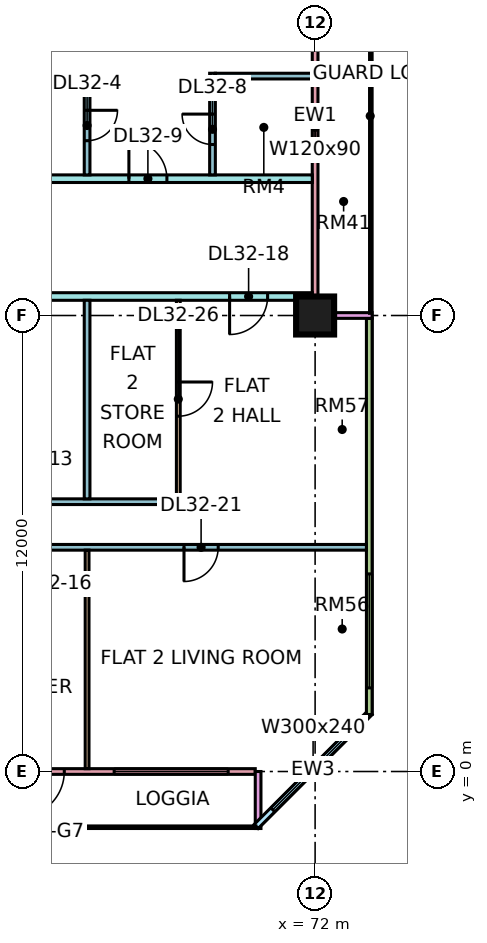
"""IFC4 building model, lengths in metres.
Left out: names, types, materials, properties, quantities, classifications, styles, units other than length and angle.
Written with IfcOpenShell. Run it as: python <this file> out.ifc"""

import sys

from ifc_helpers import new_model, si_unit, direction, frame, frame_2d, origin, origin_2d, place, context, subcontext, project, spatial, rectangle, extrude, element, fill, save


model = new_model("IFC4")
c1 = context("Model", 3, precision=1e-05, world=origin(), true_north=direction((0.0, 1.0)))
c2 = subcontext(c1, "Body", "Model", "MODEL_VIEW")
j1 = project(units=[si_unit("LENGTHUNIT", "METRE"), si_unit("PLANEANGLEUNIT", "RADIAN")], contexts=[c1])
p1 = place(None, origin())
s1 = spatial("IfcSite", under=j1, at=p1, CompositionType="ELEMENT")
p2 = place(p1, origin())
s2 = spatial("IfcBuilding", under=s1, at=p2, CompositionType="ELEMENT")
p3 = place(p2, frame((0.0, 0.0, 136.9)))
s3 = spatial("IfcBuildingStorey", under=s2, at=p3, CompositionType="ELEMENT", Elevation=136.9)
p4 = place(p3, frame((72.0, 12.0, 0.0), z_axis=(0.0, 0.0, 1.0), x_axis=(1.0, 0.0, 0.0)))
e1 = element("IfcColumn", 1, at=p4, inside=s3, PredefinedType="COLUMN", context=c2, shape_type="SweptSolid", body=[
    extrude(rectangle(XDim=1.0, YDim=1.0, at=origin_2d()), origin(), (0.0, 0.0, 1.0), 3.75),
])
p5 = place(p3, frame((60.075, 0.0, 0.0), z_axis=(0.0, 0.0, 1.0), x_axis=(1.0, 0.0, 0.0)))
e2 = element("IfcWall", 2, at=p5, inside=s3, PredefinedType="SOLIDWALL", context=c2, shape_type="SweptSolid", body=[
    extrude(rectangle(XDim=10.35, YDim=0.15, at=frame_2d((5.175, 0.0))), origin(), (0.0, 0.0, 1.0), 3.3),
])
p6 = place(p5, frame((0.562, 0.0, 0.45)))
e3 = element("IfcOpeningElement", 3, at=p6, cuts=e2, PredefinedType="OPENING", context=c2, shape_type="SweptSolid", body=[
    extrude(rectangle(XDim=1.2, YDim=2.4, at=frame_2d((0.6, 1.2))), frame((0.0, 0.085, 0.0), z_axis=(0.0, -1.0, 0.0), x_axis=(1.0, 0.0, 0.0)), (0.0, 0.0, 1.0), 0.17),
])
p7 = place(p5, frame((4.125, 0.0, 0.0)))
e4 = element("IfcOpeningElement", 4, at=p7, cuts=e2, PredefinedType="OPENING", context=c2, shape_type="SweptSolid", body=[
    extrude(rectangle(XDim=1.2, YDim=2.4, at=frame_2d((0.6, 1.2))), frame((0.0, 0.085, 0.0), z_axis=(0.0, -1.0, 0.0), x_axis=(1.0, 0.0, 0.0)), (0.0, 0.0, 1.0), 0.17),
])
p8 = place(p5, frame((6.637, 0.0, 0.45)))
e5 = element("IfcOpeningElement", 5, at=p8, cuts=e2, PredefinedType="OPENING", context=c2, shape_type="SweptSolid", body=[
    extrude(rectangle(XDim=3.0, YDim=2.4, at=frame_2d((1.5, 1.2))), frame((0.0, 0.085, 0.0), z_axis=(0.0, -1.0, 0.0), x_axis=(1.0, 0.0, 0.0)), (0.0, 0.0, 1.0), 0.17),
])
p9 = place(p3, frame((70.5, -1.5, 0.0), z_axis=(0.0, 0.0, 1.0), x_axis=(0.0, 1.0, 0.0)))
e6 = element("IfcWall", 6, at=p9, inside=s3, PredefinedType="SOLIDWALL", context=c2, shape_type="SweptSolid", body=[
    extrude(rectangle(XDim=1.5, YDim=0.15, at=frame_2d((0.75, 0.0))), origin(), (0.0, 0.0, 1.0), 3.3),
])
p10 = place(p3, frame((70.447, -1.447, 0.0), z_axis=(0.0, 0.0, 1.0), x_axis=(0.707106781187, 0.707106781187, 0.0)))
e7 = element("IfcWall", 7, at=p10, inside=s3, PredefinedType="SOLIDWALL", context=c2, shape_type="SweptSolid", body=[
    extrude(rectangle(XDim=4.243, YDim=0.15, at=frame_2d((2.121, 0.0))), origin(), (0.0, 0.0, 1.0), 3.3),
])
p11 = place(p10, frame((0.621, 0.0, 0.45)))
e8 = element("IfcOpeningElement", 8, at=p11, cuts=e7, PredefinedType="OPENING", context=c2, shape_type="SweptSolid", body=[
    extrude(rectangle(XDim=3.0, YDim=2.4, at=frame_2d((1.5, 1.2))), frame((0.0, 0.085, 0.0), z_axis=(0.0, -1.0, 0.0), x_axis=(1.0, 0.0, 0.0)), (0.0, 0.0, 1.0), 0.17),
])
p12 = place(p3, frame((73.425, 1.5, 0.0), z_axis=(0.0, 0.0, 1.0), x_axis=(0.0, 1.0, 0.0)))
e9 = element("IfcWall", 9, at=p12, inside=s3, PredefinedType="SOLIDWALL", context=c2, shape_type="SweptSolid", body=[
    extrude(rectangle(XDim=10.425, YDim=0.15, at=frame_2d((5.212, 0.0))), origin(), (0.0, 0.0, 1.0), 3.3),
])
p13 = place(p12, frame((0.7, 0.0, 0.45)))
e10 = element("IfcOpeningElement", 10, at=p13, cuts=e9, PredefinedType="OPENING", context=c2, shape_type="SweptSolid", body=[
    extrude(rectangle(XDim=3.0, YDim=2.4, at=frame_2d((1.5, 1.2))), frame((0.0, 0.085, 0.0), z_axis=(0.0, -1.0, 0.0), x_axis=(1.0, 0.0, 0.0)), (0.0, 0.0, 1.0), 0.17),
])
p14 = place(p3, frame((72.0, 12.075, 0.0), z_axis=(0.0, 0.0, 1.0), x_axis=(0.0, 1.0, 0.0)))
e11 = element("IfcWall", 11, at=p14, inside=s3, PredefinedType="SOLIDWALL", context=c2, shape_type="SweptSolid", body=[
    extrude(rectangle(XDim=10.35, YDim=0.15, at=frame_2d((5.175, 0.0))), origin(), (0.0, 0.0, 1.0), 3.3),
])
p15 = place(p14, frame((4.275, 0.0, 1.7)))
e12 = element("IfcOpeningElement", 12, at=p15, cuts=e11, PredefinedType="OPENING", context=c2, shape_type="SweptSolid", body=[
    extrude(rectangle(XDim=1.2, YDim=0.9, at=frame_2d((0.6, 0.45))), frame((0.0, 0.085, 0.0), z_axis=(0.0, -1.0, 0.0), x_axis=(1.0, 0.0, 0.0)), (0.0, 0.0, 1.0), 0.17),
])
p16 = place(p14, frame((7.988, 0.0, 0.45)))
e13 = element("IfcOpeningElement", 13, at=p16, cuts=e11, PredefinedType="OPENING", context=c2, shape_type="SweptSolid", body=[
    extrude(rectangle(XDim=1.8, YDim=2.4, at=frame_2d((0.9, 1.2))), frame((0.0, 0.085, 0.0), z_axis=(0.0, -1.0, 0.0), x_axis=(1.0, 0.0, 0.0)), (0.0, 0.0, 1.0), 0.17),
])
p17 = place(p3, frame((73.5, 12.0, 0.0), z_axis=(0.0, 0.0, 1.0), x_axis=(-1.0, 0.0, 0.0)))
e14 = element("IfcWall", 14, at=p17, inside=s3, PredefinedType="SOLIDWALL", context=c2, shape_type="SweptSolid", body=[
    extrude(rectangle(XDim=1.5, YDim=0.15, at=frame_2d((0.75, 0.0))), origin(), (0.0, 0.0, 1.0), 3.3),
])
p18 = place(p3, frame((40.65, 12.5, 0.0), z_axis=(0.0, 0.0, 1.0), x_axis=(1.0, 0.0, 0.0)))
e15 = element("IfcWall", 15, at=p18, inside=s3, PredefinedType="PARTITIONING", context=c2, shape_type="SweptSolid", body=[
    extrude(rectangle(XDim=31.276, YDim=0.2, at=frame_2d((15.638, 0.0))), origin(), (0.0, 0.0, 1.0), 3.3),
])
p19 = place(p18, frame((29.1, 0.0, 0.0)))
e16 = element("IfcOpeningElement", 16, at=p19, cuts=e15, PredefinedType="OPENING", context=c2, shape_type="SweptSolid", body=[
    extrude(rectangle(XDim=1.0, YDim=2.1, at=frame_2d((0.5, 1.05))), frame((0.0, 0.11, 0.0), z_axis=(0.0, -1.0, 0.0), x_axis=(1.0, 0.0, 0.0)), (0.0, 0.0, 1.0), 0.22),
])
p20 = place(p18, frame((1.05, 0.0, 0.0)))
e17 = element("IfcOpeningElement", 17, at=p20, cuts=e15, PredefinedType="OPENING", context=c2, shape_type="SweptSolid", body=[
    extrude(rectangle(XDim=1.0, YDim=2.1, at=frame_2d((0.5, 1.05))), frame((0.0, 0.11, 0.0), z_axis=(0.0, -1.0, 0.0), x_axis=(1.0, 0.0, 0.0)), (0.0, 0.0, 1.0), 0.22),
])
p21 = place(p3, frame((48.1, 5.9, 0.0), z_axis=(0.0, 0.0, 1.0), x_axis=(1.0, 0.0, 0.0)))
e18 = element("IfcWall", 18, at=p21, inside=s3, PredefinedType="PARTITIONING", context=c2, shape_type="SweptSolid", body=[
    extrude(rectangle(XDim=25.25, YDim=0.15, at=frame_2d((12.625, 0.0))), origin(), (0.0, 0.0, 1.0), 3.3),
])
p22 = place(p21, frame((6.95, 0.0, 0.0)))
e19 = element("IfcOpeningElement", 19, at=p22, cuts=e18, PredefinedType="OPENING", context=c2, shape_type="SweptSolid", body=[
    extrude(rectangle(XDim=0.9, YDim=2.1, at=frame_2d((0.45, 1.05))), frame((0.0, 0.085, 0.0), z_axis=(0.0, -1.0, 0.0), x_axis=(1.0, 0.0, 0.0)), (0.0, 0.0, 1.0), 0.17),
])
p23 = place(p21, frame((9.95, 0.0, 0.0)))
e20 = element("IfcOpeningElement", 20, at=p23, cuts=e18, PredefinedType="OPENING", context=c2, shape_type="SweptSolid", body=[
    extrude(rectangle(XDim=0.9, YDim=2.1, at=frame_2d((0.45, 1.05))), frame((0.0, 0.085, 0.0), z_axis=(0.0, -1.0, 0.0), x_axis=(1.0, 0.0, 0.0)), (0.0, 0.0, 1.0), 0.17),
])
p24 = place(p21, frame((15.95, 0.0, 0.0)))
e21 = element("IfcOpeningElement", 21, at=p24, cuts=e18, PredefinedType="OPENING", context=c2, shape_type="SweptSolid", body=[
    extrude(rectangle(XDim=0.9, YDim=2.1, at=frame_2d((0.45, 1.05))), frame((0.0, 0.085, 0.0), z_axis=(0.0, -1.0, 0.0), x_axis=(1.0, 0.0, 0.0)), (0.0, 0.0, 1.0), 0.17),
])
p25 = place(p21, frame((20.45, 0.0, 0.0)))
e22 = element("IfcOpeningElement", 22, at=p25, cuts=e18, PredefinedType="OPENING", context=c2, shape_type="SweptSolid", body=[
    extrude(rectangle(XDim=0.9, YDim=2.1, at=frame_2d((0.45, 1.05))), frame((0.0, 0.085, 0.0), z_axis=(0.0, -1.0, 0.0), x_axis=(1.0, 0.0, 0.0)), (0.0, 0.0, 1.0), 0.17),
])
p26 = place(p21, frame((1.8, 0.0, 0.0)))
e23 = element("IfcOpeningElement", 23, at=p26, cuts=e18, PredefinedType="OPENING", context=c2, shape_type="SweptSolid", body=[
    extrude(rectangle(XDim=0.8, YDim=2.1, at=frame_2d((0.4, 1.05))), frame((0.0, 0.085, 0.0), z_axis=(0.0, -1.0, 0.0), x_axis=(1.0, 0.0, 0.0)), (0.0, 0.0, 1.0), 0.17),
])
p27 = place(p21, frame((3.65, 0.0, 0.0)))
e24 = element("IfcOpeningElement", 24, at=p27, cuts=e18, PredefinedType="OPENING", context=c2, shape_type="SweptSolid", body=[
    extrude(rectangle(XDim=1.6, YDim=2.1, at=frame_2d((0.8, 1.05))), frame((0.0, 0.085, 0.0), z_axis=(0.0, -1.0, 0.0), x_axis=(1.0, 0.0, 0.0)), (0.0, 0.0, 1.0), 0.17),
])
p28 = place(p3, frame((48.1, 7.1, 0.0), z_axis=(0.0, 0.0, 1.0), x_axis=(1.0, 0.0, 0.0)))
e25 = element("IfcWall", 25, at=p28, inside=s3, PredefinedType="PARTITIONING", context=c2, shape_type="SweptSolid", body=[
    extrude(rectangle(XDim=20.35, YDim=0.15, at=frame_2d((10.175, 0.0))), origin(), (0.0, 0.0, 1.0), 3.3),
])
p29 = place(p28, frame((16.05, 0.0, 0.0)))
e26 = element("IfcOpeningElement", 26, at=p29, cuts=e25, PredefinedType="OPENING", context=c2, shape_type="SweptSolid", body=[
    extrude(rectangle(XDim=0.8, YDim=2.1, at=frame_2d((0.4, 1.05))), frame((0.0, 0.085, 0.0), z_axis=(0.0, -1.0, 0.0), x_axis=(1.0, 0.0, 0.0)), (0.0, 0.0, 1.0), 0.17),
])
p30 = place(p28, frame((11.6, 0.0, 0.0)))
e27 = element("IfcOpeningElement", 27, at=p30, cuts=e25, PredefinedType="OPENING", context=c2, shape_type="SweptSolid", body=[
    extrude(rectangle(XDim=0.9, YDim=2.1, at=frame_2d((0.45, 1.05))), frame((0.0, 0.085, 0.0), z_axis=(0.0, -1.0, 0.0), x_axis=(1.0, 0.0, 0.0)), (0.0, 0.0, 1.0), 0.17),
])
p31 = place(p28, frame((3.9, 0.0, 0.0)))
e28 = element("IfcOpeningElement", 28, at=p31, cuts=e25, PredefinedType="OPENING", context=c2, shape_type="SweptSolid", body=[
    extrude(rectangle(XDim=0.8, YDim=2.1, at=frame_2d((0.4, 1.05))), frame((0.0, 0.085, 0.0), z_axis=(0.0, -1.0, 0.0), x_axis=(1.0, 0.0, 0.0)), (0.0, 0.0, 1.0), 0.17),
])
p32 = place(p28, frame((0.95, 0.0, 0.0)))
e29 = element("IfcOpeningElement", 29, at=p32, cuts=e25, PredefinedType="OPENING", context=c2, shape_type="SweptSolid", body=[
    extrude(rectangle(XDim=0.9, YDim=2.1, at=frame_2d((0.45, 1.05))), frame((0.0, 0.085, 0.0), z_axis=(0.0, -1.0, 0.0), x_axis=(1.0, 0.0, 0.0)), (0.0, 0.0, 1.0), 0.17),
])
p33 = place(p28, frame((7.05, 0.0, 0.0)))
e30 = element("IfcOpeningElement", 30, at=p33, cuts=e25, PredefinedType="OPENING", context=c2, shape_type="SweptSolid", body=[
    extrude(rectangle(XDim=0.8, YDim=2.1, at=frame_2d((0.4, 1.05))), frame((0.0, 0.085, 0.0), z_axis=(0.0, -1.0, 0.0), x_axis=(1.0, 0.0, 0.0)), (0.0, 0.0, 1.0), 0.17),
])
p34 = place(p3, frame((51.225, 15.6, 0.0), z_axis=(0.0, 0.0, 1.0), x_axis=(1.0, 0.0, 0.0)))
e31 = element("IfcWall", 31, at=p34, inside=s3, PredefinedType="PARTITIONING", context=c2, shape_type="SweptSolid", body=[
    extrude(rectangle(XDim=20.701, YDim=0.2, at=frame_2d((10.351, 0.0))), origin(), (0.0, 0.0, 1.0), 3.3),
])
p35 = place(p34, frame((15.875, 0.0, 0.0)))
e32 = element("IfcOpeningElement", 32, at=p35, cuts=e31, PredefinedType="OPENING", context=c2, shape_type="SweptSolid", body=[
    extrude(rectangle(XDim=1.0, YDim=2.1, at=frame_2d((0.5, 1.05))), frame((0.0, 0.11, 0.0), z_axis=(0.0, -1.0, 0.0), x_axis=(1.0, 0.0, 0.0)), (0.0, 0.0, 1.0), 0.22),
])
p36 = place(p34, frame((0.875, 0.0, 0.0)))
e33 = element("IfcOpeningElement", 33, at=p36, cuts=e31, PredefinedType="OPENING", context=c2, shape_type="SweptSolid", body=[
    extrude(rectangle(XDim=1.0, YDim=2.1, at=frame_2d((0.5, 1.05))), frame((0.0, 0.11, 0.0), z_axis=(0.0, -1.0, 0.0), x_axis=(1.0, 0.0, 0.0)), (0.0, 0.0, 1.0), 0.22),
])
p37 = place(p3, frame((54.1, 18.3, 0.0), z_axis=(0.0, 0.0, 1.0), x_axis=(1.0, 0.0, 0.0)))
e34 = element("IfcWall", 34, at=p37, inside=s3, PredefinedType="PARTITIONING", context=c2, shape_type="SweptSolid", body=[
    extrude(rectangle(XDim=11.975, YDim=0.15, at=frame_2d((5.987, 0.0))), origin(), (0.0, 0.0, 1.0), 3.3),
])
p38 = place(p37, frame((5.45, 0.0, 0.0)))
e35 = element("IfcOpeningElement", 35, at=p38, cuts=e34, PredefinedType="OPENING", context=c2, shape_type="SweptSolid", body=[
    extrude(rectangle(XDim=0.9, YDim=2.1, at=frame_2d((0.45, 1.05))), frame((0.0, 0.085, 0.0), z_axis=(0.0, -1.0, 0.0), x_axis=(1.0, 0.0, 0.0)), (0.0, 0.0, 1.0), 0.17),
])
p39 = place(p37, frame((1.25, 0.0, 0.0)))
e36 = element("IfcOpeningElement", 36, at=p39, cuts=e34, PredefinedType="OPENING", context=c2, shape_type="SweptSolid", body=[
    extrude(rectangle(XDim=0.9, YDim=2.1, at=frame_2d((0.45, 1.05))), frame((0.0, 0.085, 0.0), z_axis=(0.0, -1.0, 0.0), x_axis=(1.0, 0.0, 0.0)), (0.0, 0.0, 1.0), 0.17),
])
p40 = place(p3, frame((66.0, 0.074, 0.0), z_axis=(0.0, 0.0, 1.0), x_axis=(0.0, 1.0, 0.0)))
e37 = element("IfcWall", 37, at=p40, inside=s3, PredefinedType="PARTITIONING", context=c2, shape_type="SweptSolid", body=[
    extrude(rectangle(XDim=5.751, YDim=0.1, at=frame_2d((2.875, 0.0))), origin(), (0.0, 0.0, 1.0), 3.3),
])
p41 = place(p3, frame((66.0, 7.175, 0.0), z_axis=(0.0, 0.0, 1.0), x_axis=(0.0, 1.0, 0.0)))
e38 = element("IfcWall", 38, at=p41, inside=s3, PredefinedType="PARTITIONING", context=c2, shape_type="SweptSolid", body=[
    extrude(rectangle(XDim=5.225, YDim=0.15, at=frame_2d((2.612, 0.0))), origin(), (0.0, 0.0, 1.0), 3.3),
])
p42 = place(p3, frame((66.0, 15.7, 0.0), z_axis=(0.0, 0.0, 1.0), x_axis=(0.0, 1.0, 0.0)))
e39 = element("IfcWall", 39, at=p42, inside=s3, PredefinedType="PARTITIONING", context=c2, shape_type="SweptSolid", body=[
    extrude(rectangle(XDim=2.525, YDim=0.15, at=frame_2d((1.263, 0.0))), origin(), (0.0, 0.0, 1.0), 3.3),
])
p43 = place(p42, frame((0.9, 0.0, 0.0)))
e40 = element("IfcOpeningElement", 40, at=p43, cuts=e39, PredefinedType="OPENING", context=c2, shape_type="SweptSolid", body=[
    extrude(rectangle(XDim=0.8, YDim=2.1, at=frame_2d((0.4, 1.05))), frame((0.0, 0.085, 0.0), z_axis=(0.0, -1.0, 0.0), x_axis=(1.0, 0.0, 0.0)), (0.0, 0.0, 1.0), 0.17),
])
p44 = place(p3, frame((68.4, 7.175, 0.0), z_axis=(0.0, 0.0, 1.0), x_axis=(0.0, 1.0, 0.0)))
e41 = element("IfcWall", 41, at=p44, inside=s3, PredefinedType="PARTITIONING", context=c2, shape_type="SweptSolid", body=[
    extrude(rectangle(XDim=5.225, YDim=0.1, at=frame_2d((2.612, 0.0))), origin(), (0.0, 0.0, 1.0), 3.3),
])
p45 = place(p44, frame((2.175, 0.0, 0.0)))
e42 = element("IfcOpeningElement", 42, at=p45, cuts=e41, PredefinedType="OPENING", context=c2, shape_type="SweptSolid", body=[
    extrude(rectangle(XDim=0.9, YDim=2.1, at=frame_2d((0.45, 1.05))), frame((0.0, 0.06, 0.0), z_axis=(0.0, -1.0, 0.0), x_axis=(1.0, 0.0, 0.0)), (0.0, 0.0, 1.0), 0.12),
])
p46 = place(p3, frame((69.3, 15.7, 0.0), z_axis=(0.0, 0.0, 1.0), x_axis=(0.0, 1.0, 0.0)))
e43 = element("IfcWall", 43, at=p46, inside=s3, PredefinedType="PARTITIONING", context=c2, shape_type="SweptSolid", body=[
    extrude(rectangle(XDim=2.675, YDim=0.15, at=frame_2d((1.337, 0.0))), origin(), (0.0, 0.0, 1.0), 3.3),
])
p47 = place(p46, frame((0.8, 0.0, 0.0)))
e44 = element("IfcOpeningElement", 44, at=p47, cuts=e43, PredefinedType="OPENING", context=c2, shape_type="SweptSolid", body=[
    extrude(rectangle(XDim=0.8, YDim=2.1, at=frame_2d((0.4, 1.05))), frame((0.0, 0.085, 0.0), z_axis=(0.0, -1.0, 0.0), x_axis=(1.0, 0.0, 0.0)), (0.0, 0.0, 1.0), 0.17),
])
p48 = place(p3, frame((69.375, 18.3, 0.0), z_axis=(0.0, 0.0, 1.0), x_axis=(1.0, 0.0, 0.0)))
e45 = element("IfcWall", 45, at=p48, inside=s3, PredefinedType="PARTITIONING", context=c2, shape_type="SweptSolid", body=[
    extrude(rectangle(XDim=2.551, YDim=0.15, at=frame_2d((1.275, 0.0))), origin(), (0.0, 0.0, 1.0), 3.3),
])
p49 = place(p7, frame((1.2, 0.0, 0.0), z_axis=(0.0, 0.0, 1.0), x_axis=(-1.0, 0.0, 0.0)))
e46 = element("IfcDoor", 46, at=p49, inside=s3, OperationType="DOUBLE_DOOR_SINGLE_SWING", PredefinedType="DOOR", context=c2, shape_type="SweptSolid", body=[
    extrude(rectangle(XDim=1.2, YDim=2.4, at=frame_2d((0.6, 1.2))), frame((0.0, 0.025, 0.0), z_axis=(0.0, -1.0, 0.0), x_axis=(1.0, 0.0, 0.0)), (0.0, 0.0, 1.0), 0.05),
])
fill(e4, e46)
p50 = place(p8, origin())
e47 = element("IfcWindow", 47, at=p50, inside=s3, PartitioningType="SINGLE_PANEL", PredefinedType="WINDOW", context=c2, shape_type="SweptSolid", body=[
    extrude(rectangle(XDim=3.0, YDim=2.4, at=frame_2d((1.5, 1.2))), frame((0.0, 0.03, 0.0), z_axis=(0.0, -1.0, 0.0), x_axis=(1.0, 0.0, 0.0)), (0.0, 0.0, 1.0), 0.06),
])
fill(e5, e47)
p51 = place(p11, origin())
e48 = element("IfcWindow", 48, at=p51, inside=s3, PartitioningType="SINGLE_PANEL", PredefinedType="WINDOW", context=c2, shape_type="SweptSolid", body=[
    extrude(rectangle(XDim=3.0, YDim=2.4, at=frame_2d((1.5, 1.2))), frame((0.0, 0.03, 0.0), z_axis=(0.0, -1.0, 0.0), x_axis=(1.0, 0.0, 0.0)), (0.0, 0.0, 1.0), 0.06),
])
fill(e8, e48)
p52 = place(p13, origin())
e49 = element("IfcWindow", 49, at=p52, inside=s3, PartitioningType="SINGLE_PANEL", PredefinedType="WINDOW", context=c2, shape_type="SweptSolid", body=[
    extrude(rectangle(XDim=3.0, YDim=2.4, at=frame_2d((1.5, 1.2))), frame((0.0, 0.03, 0.0), z_axis=(0.0, -1.0, 0.0), x_axis=(1.0, 0.0, 0.0)), (0.0, 0.0, 1.0), 0.06),
])
fill(e10, e49)
p53 = place(p15, origin())
e50 = element("IfcWindow", 50, at=p53, inside=s3, PartitioningType="SINGLE_PANEL", PredefinedType="WINDOW", context=c2, shape_type="SweptSolid", body=[
    extrude(rectangle(XDim=1.2, YDim=0.9, at=frame_2d((0.6, 0.45))), frame((0.0, 0.03, 0.0), z_axis=(0.0, -1.0, 0.0), x_axis=(1.0, 0.0, 0.0)), (0.0, 0.0, 1.0), 0.06),
])
fill(e12, e50)
p54 = place(p43, origin())
e51 = element("IfcDoor", 51, at=p54, inside=s3, OperationType="SINGLE_SWING_RIGHT", PredefinedType="DOOR", context=c2, shape_type="SweptSolid", body=[
    extrude(rectangle(XDim=0.8, YDim=2.1, at=frame_2d((0.4, 1.05))), frame((0.0, 0.025, 0.0), z_axis=(0.0, -1.0, 0.0), x_axis=(1.0, 0.0, 0.0)), (0.0, 0.0, 1.0), 0.05),
])
fill(e40, e51)
p55 = place(p47, frame((0.8, 0.0, 0.0), z_axis=(0.0, 0.0, 1.0), x_axis=(-1.0, 0.0, 0.0)))
e52 = element("IfcDoor", 52, at=p55, inside=s3, OperationType="SINGLE_SWING_RIGHT", PredefinedType="DOOR", context=c2, shape_type="SweptSolid", body=[
    extrude(rectangle(XDim=0.8, YDim=2.1, at=frame_2d((0.4, 1.05))), frame((0.0, 0.025, 0.0), z_axis=(0.0, -1.0, 0.0), x_axis=(1.0, 0.0, 0.0)), (0.0, 0.0, 1.0), 0.05),
])
fill(e44, e52)
p56 = place(p35, origin())
e53 = element("IfcDoor", 53, at=p56, inside=s3, OperationType="SINGLE_SWING_LEFT", PredefinedType="DOOR", context=c2, shape_type="SweptSolid", body=[
    extrude(rectangle(XDim=1.0, YDim=2.1, at=frame_2d((0.5, 1.05))), frame((0.0, 0.025, 0.0), z_axis=(0.0, -1.0, 0.0), x_axis=(1.0, 0.0, 0.0)), (0.0, 0.0, 1.0), 0.05),
])
fill(e32, e53)
p57 = place(p19, frame((1.0, 0.0, 0.0), z_axis=(0.0, 0.0, 1.0), x_axis=(-1.0, 0.0, 0.0)))
e54 = element("IfcDoor", 54, at=p57, inside=s3, OperationType="SINGLE_SWING_LEFT", PredefinedType="DOOR", context=c2, shape_type="SweptSolid", body=[
    extrude(rectangle(XDim=1.0, YDim=2.1, at=frame_2d((0.5, 1.05))), frame((0.0, 0.025, 0.0), z_axis=(0.0, -1.0, 0.0), x_axis=(1.0, 0.0, 0.0)), (0.0, 0.0, 1.0), 0.05),
])
fill(e16, e54)
p58 = place(p25, frame((0.9, 0.0, 0.0), z_axis=(0.0, 0.0, 1.0), x_axis=(-1.0, 0.0, 0.0)))
e55 = element("IfcDoor", 55, at=p58, inside=s3, OperationType="SINGLE_SWING_LEFT", PredefinedType="DOOR", context=c2, shape_type="SweptSolid", body=[
    extrude(rectangle(XDim=0.9, YDim=2.1, at=frame_2d((0.45, 1.05))), frame((0.0, 0.025, 0.0), z_axis=(0.0, -1.0, 0.0), x_axis=(1.0, 0.0, 0.0)), (0.0, 0.0, 1.0), 0.05),
])
fill(e22, e55)
p59 = place(p45, origin())
e56 = element("IfcDoor", 56, at=p59, inside=s3, OperationType="SINGLE_SWING_RIGHT", PredefinedType="DOOR", context=c2, shape_type="SweptSolid", body=[
    extrude(rectangle(XDim=0.9, YDim=2.1, at=frame_2d((0.45, 1.05))), frame((0.0, 0.025, 0.0), z_axis=(0.0, -1.0, 0.0), x_axis=(1.0, 0.0, 0.0)), (0.0, 0.0, 1.0), 0.05),
])
fill(e42, e56)
save(model, sys.argv[1])
